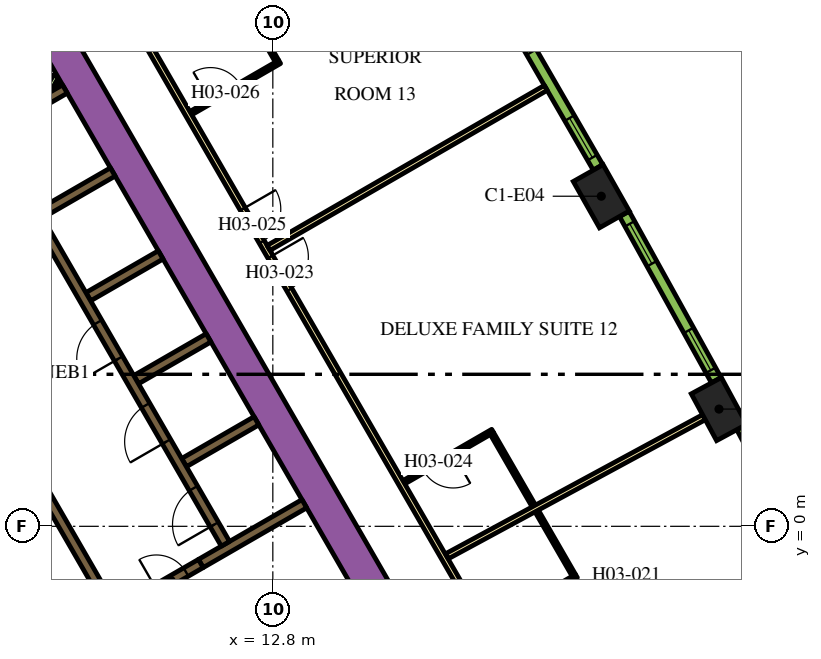
"""IFC4 building model, lengths in metres.
Left out: names, types, materials, properties, quantities, classifications, styles, units other than length and angle.
Written with IfcOpenShell. Run it as: python <this file> out.ifc"""

import sys

from ifc_helpers import new_model, si_unit, direction, frame, frame_2d, origin, origin_2d, place, context, subcontext, project, spatial, polyline, rectangle, outline, extrude, element, fill, save


model = new_model("IFC4")
c1 = context("Model", 3, precision=1e-05, world=origin(), true_north=direction((0.0, 1.0)))
c2 = subcontext(c1, "Body", "Model", "MODEL_VIEW")
j1 = project(units=[si_unit("LENGTHUNIT", "METRE"), si_unit("PLANEANGLEUNIT", "RADIAN")], contexts=[c1])
p1 = place(None, origin())
s1 = spatial("IfcSite", under=j1, at=p1, CompositionType="ELEMENT")
p2 = place(p1, origin())
s2 = spatial("IfcBuilding", under=s1, at=p2, CompositionType="ELEMENT")
p3 = place(p2, frame((0.0, 0.0, 51.0)))
s3 = spatial("IfcBuildingStorey", under=s2, at=p3, CompositionType="ELEMENT", Elevation=51.0)
for number, where, z_axis, x_axis in (
    (1, (24.54, 3.085, 0.0), (0.0, 0.0, 1.0), (-0.476, 0.88, 0.0)),
    (2, (21.443, 8.685, 0.0), (0.0, 0.0, 1.0), (-0.492, 0.871, 0.0)),
):
    element("IfcColumn", number, at=place(p3, frame(where, z_axis=z_axis, x_axis=x_axis)), inside=s3, PredefinedType="COLUMN", context=c2, shape_type="SweptSolid", body=[
        extrude(rectangle(XDim=1.4, YDim=0.9, at=origin_2d()), origin(), (0.0, 0.0, 1.0), 3.9),
    ])
p4 = place(p3, frame((6.776, 13.364, 0.0), z_axis=(0.0, 0.0, 1.0), x_axis=(0.500004177138, -0.8660229921, 0.0)))
e3 = element("IfcWall", 3, at=p4, inside=s3, PredefinedType="SOLIDWALL", context=c2, shape_type="SweptSolid", body=[
    extrude(rectangle(XDim=20.204, YDim=0.9, at=frame_2d((10.102, 0.0))), origin(), (0.0, 0.0, 1.0), 3.9),
])
p5 = place(p3, frame((10.464, 1.677, 0.0), z_axis=(0.0, 0.0, 1.0), x_axis=(0.86605622881, 0.499946605688, 0.0)))
e4 = element("IfcWall", 4, at=p5, inside=s3, PredefinedType="SOLIDWALL", context=c2, shape_type="SweptSolid", body=[
    extrude(rectangle(XDim=2.2, YDim=0.25, at=frame_2d((1.1, 0.0))), origin(), (0.0, 0.0, 1.0), 3.9),
])
p6 = place(p3, frame((13.629, 0.594, 0.0), z_axis=(0.0, 0.0, 1.0), x_axis=(-0.86602790099, -0.499995674689, 0.0)))
e5 = element("IfcWall", 5, at=p6, inside=s3, PredefinedType="SOLIDWALL", context=c2, shape_type="SweptSolid", body=[
    extrude(rectangle(XDim=3.146, YDim=0.25, at=frame_2d((1.573, 0.0))), origin(), (0.0, 0.0, 1.0), 3.9),
])
for number, where, z_axis, x_axis in (
    (6, (9.204, 3.859, 0.0), (0.0, 0.0, 1.0), (0.866, 0.5, 0.0)),
    (7, (7.944, 6.041, 0.0), (0.0, 0.0, 1.0), (0.866, 0.5, 0.0)),
    (8, (6.684, 8.224, 0.0), (0.0, 0.0, 1.0), (0.866, 0.5, 0.0)),
):
    element("IfcWall", number, at=place(p3, frame(where, z_axis=z_axis, x_axis=x_axis)), inside=s3, PredefinedType="SOLIDWALL", context=c2, shape_type="SweptSolid", body=[
        extrude(rectangle(XDim=2.2, YDim=0.25, at=frame_2d((1.1, 0.0))), origin(), (0.0, 0.0, 1.0), 3.9),
    ])
p7 = place(p3, origin())
e9 = element("IfcWall", 9, at=p7, inside=s3, PredefinedType="SOLIDWALL", context=c2, shape_type="SweptSolid", body=[
    extrude(outline(polyline([(5.27, 10.173), (5.27, 10.173), (4.683, 9.834), (4.504, 9.731), (4.442, 9.839), (4.431, 9.856), (4.419, 9.871), (4.406, 9.885), (4.39, 9.898), (4.374, 9.909), (4.357, 9.918), (4.341, 9.925), (7.266, 11.614), (7.391, 11.398), (5.486, 10.298), (5.486, 10.298), (5.27, 10.173), (5.27, 10.173)])), origin(), (0.0, 0.0, 1.0), 3.9),
])
p8 = place(p3, frame((6.872, 11.45, 0.0), z_axis=(0.0, 0.0, 1.0), x_axis=(0.499846793097, 0.866113839764, 0.0)))
e10 = element("IfcWall", 10, at=p8, inside=s3, PredefinedType="PARTITIONING", context=c2, shape_type="SweptSolid", body=[
    extrude(rectangle(XDim=0.453, YDim=0.15, at=frame_2d((0.227, 0.0))), origin(), (0.0, 0.0, 1.0), 2.75),
])
p9 = place(p3, frame((7.131, 11.6, 0.0), z_axis=(0.0, 0.0, 1.0), x_axis=(0.498600033135, 0.866832167699, 0.0)))
e11 = element("IfcWall", 11, at=p9, inside=s3, PredefinedType="PARTITIONING", context=c2, shape_type="SweptSolid", body=[
    extrude(rectangle(XDim=0.107, YDim=0.15, at=frame_2d((0.053, 0.0))), origin(), (0.0, 0.0, 1.0), 2.75),
])
p10 = place(p3, frame((11.553, -0.46, 0.0), z_axis=(0.0, 0.0, 1.0), x_axis=(-0.500006514828, 0.866021642414, 0.0)))
e12 = element("IfcWall", 12, at=p10, inside=s3, PredefinedType="SOLIDWALL", context=c2, shape_type="SweptSolid", body=[
    extrude(rectangle(XDim=12.35, YDim=0.25, at=frame_2d((6.175, 0.0))), origin(), (0.0, 0.0, 1.0), 3.9),
])
p11 = place(p10, frame((0.585, 0.0, 0.0)))
e13 = element("IfcOpeningElement", 13, at=p11, cuts=e12, PredefinedType="OPENING", context=c2, shape_type="SweptSolid", body=[
    extrude(rectangle(XDim=1.1, YDim=2.1, at=frame_2d((0.55, 1.05))), frame((0.0, 0.135, 0.0), z_axis=(0.0, -1.0, 0.0), x_axis=(1.0, 0.0, 0.0)), (0.0, 0.0, 1.0), 0.27),
])
p12 = place(p10, frame((3.105, 0.0, 0.0)))
e14 = element("IfcOpeningElement", 14, at=p12, cuts=e12, PredefinedType="OPENING", context=c2, shape_type="SweptSolid", body=[
    extrude(rectangle(XDim=1.1, YDim=2.1, at=frame_2d((0.55, 1.05))), frame((0.0, 0.135, 0.0), z_axis=(0.0, -1.0, 0.0), x_axis=(1.0, 0.0, 0.0)), (0.0, 0.0, 1.0), 0.27),
])
p13 = place(p10, frame((5.625, 0.0, 0.0)))
e15 = element("IfcOpeningElement", 15, at=p13, cuts=e12, PredefinedType="OPENING", context=c2, shape_type="SweptSolid", body=[
    extrude(rectangle(XDim=1.1, YDim=2.1, at=frame_2d((0.55, 1.05))), frame((0.0, 0.135, 0.0), z_axis=(0.0, -1.0, 0.0), x_axis=(1.0, 0.0, 0.0)), (0.0, 0.0, 1.0), 0.27),
])
p14 = place(p3, frame((8.565, -2.185, 0.0), z_axis=(0.0, 0.0, 1.0), x_axis=(-0.499997954832, 0.866026584559, 0.0)))
e16 = element("IfcWall", 16, at=p14, inside=s3, PredefinedType="SOLIDWALL", context=c2, shape_type="SweptSolid", body=[
    extrude(rectangle(XDim=12.35, YDim=0.25, at=frame_2d((6.175, 0.0))), origin(), (0.0, 0.0, 1.0), 3.9),
])
p15 = place(p14, frame((5.725, 0.0, 0.0)))
e17 = element("IfcOpeningElement", 17, at=p15, cuts=e16, PredefinedType="OPENING", context=c2, shape_type="SweptSolid", body=[
    extrude(rectangle(XDim=0.9, YDim=2.1, at=frame_2d((0.45, 1.05))), frame((0.0, 0.135, 0.0), z_axis=(0.0, -1.0, 0.0), x_axis=(1.0, 0.0, 0.0)), (0.0, 0.0, 1.0), 0.27),
])
p16 = place(p3, frame((9.346, -1.879, 0.0), z_axis=(0.0, 0.0, 1.0), x_axis=(0.866047807691, 0.499961193289, 0.0)))
e18 = element("IfcWall", 18, at=p16, inside=s3, PredefinedType="SOLIDWALL", context=c2, shape_type="SweptSolid", body=[
    extrude(rectangle(XDim=1.8, YDim=0.25, at=frame_2d((0.9, 0.0))), origin(), (0.0, 0.0, 1.0), 3.9),
])
p17 = place(p16, frame((0.45, 0.0, 0.0)))
e19 = element("IfcOpeningElement", 19, at=p17, cuts=e18, PredefinedType="OPENING", context=c2, shape_type="SweptSolid", body=[
    extrude(rectangle(XDim=0.9, YDim=2.1, at=frame_2d((0.45, 1.05))), frame((0.0, 0.135, 0.0), z_axis=(0.0, -1.0, 0.0), x_axis=(1.0, 0.0, 0.0)), (0.0, 0.0, 1.0), 0.27),
])
p18 = place(p3, frame((6.163, 18.475, 0.0), z_axis=(0.0, 0.0, 1.0), x_axis=(0.500001317485, -0.866024643133, 0.0)))
e20 = element("IfcWall", 20, at=p18, inside=s3, PredefinedType="PARTITIONING", context=c2, shape_type="SweptSolid", body=[
    extrude(rectangle(XDim=25.767, YDim=0.15, at=frame_2d((12.883, 0.0))), origin(), (0.0, 0.0, 1.0), 2.75),
])
p19 = place(p18, frame((24.586, 0.0, 0.0)))
e21 = element("IfcOpeningElement", 21, at=p19, cuts=e20, PredefinedType="OPENING", context=c2, shape_type="SweptSolid", body=[
    extrude(rectangle(XDim=1.0, YDim=2.1, at=frame_2d((0.5, 1.05))), frame((0.0, 0.085, 0.0), z_axis=(0.0, -1.0, 0.0), x_axis=(1.0, 0.0, 0.0)), (0.0, 0.0, 1.0), 0.17),
])
p20 = place(p18, frame((13.144, 0.0, 0.0)))
e22 = element("IfcOpeningElement", 22, at=p20, cuts=e20, PredefinedType="OPENING", context=c2, shape_type="SweptSolid", body=[
    extrude(rectangle(XDim=1.0, YDim=2.1, at=frame_2d((0.5, 1.05))), frame((0.0, 0.085, 0.0), z_axis=(0.0, -1.0, 0.0), x_axis=(1.0, 0.0, 0.0)), (0.0, 0.0, 1.0), 0.17),
])
p21 = place(p18, frame((11.692, 0.0, 0.0)))
e23 = element("IfcOpeningElement", 23, at=p21, cuts=e20, PredefinedType="OPENING", context=c2, shape_type="SweptSolid", body=[
    extrude(rectangle(XDim=1.0, YDim=2.1, at=frame_2d((0.5, 1.05))), frame((0.0, 0.085, 0.0), z_axis=(0.0, -1.0, 0.0), x_axis=(1.0, 0.0, 0.0)), (0.0, 0.0, 1.0), 0.17),
])
p22 = place(p18, frame((0.572, 0.0, 0.0)))
e24 = element("IfcOpeningElement", 24, at=p22, cuts=e20, PredefinedType="OPENING", context=c2, shape_type="SweptSolid", body=[
    extrude(rectangle(XDim=1.0, YDim=2.1, at=frame_2d((0.5, 1.05))), frame((0.0, 0.085, 0.0), z_axis=(0.0, -1.0, 0.0), x_axis=(1.0, 0.0, 0.0)), (0.0, 0.0, 1.0), 0.17),
])
p23 = place(p3, frame((19.982, 11.537, 0.0), z_axis=(0.0, 0.0, 1.0), x_axis=(-0.866020994654, -0.500007636761, 0.0)))
e25 = element("IfcWall", 25, at=p23, inside=s3, PredefinedType="PARTITIONING", context=c2, shape_type="SweptSolid", body=[
    extrude(rectangle(XDim=8.423, YDim=0.15, at=frame_2d((4.211, 0.0))), origin(), (0.0, 0.0, 1.0), 2.75),
])
p24 = place(p3, frame((24.145, 2.871, 0.0), z_axis=(0.0, 0.0, 1.0), x_axis=(-0.879551725039, -0.475803281809, 0.0)))
e26 = element("IfcWall", 26, at=p24, inside=s3, PredefinedType="PARTITIONING", context=c2, shape_type="SweptSolid", body=[
    extrude(rectangle(XDim=7.688, YDim=0.15, at=frame_2d((3.844, 0.0))), origin(), (0.0, 0.0, 1.0), 2.75),
])
p25 = place(p3, frame((18.451, -2.657, 0.0), z_axis=(0.0, 0.0, 1.0), x_axis=(0.86599734893, 0.500048589285, 0.0)))
e27 = element("IfcWall", 27, at=p25, inside=s3, PredefinedType="PARTITIONING", context=c2, shape_type="SweptSolid", body=[
    extrude(rectangle(XDim=2.7, YDim=0.1, at=frame_2d((1.35, 0.0))), origin(), (0.0, 0.0, 1.0), 2.75),
])
p26 = place(p25, frame((0.6, 0.0, 0.0)))
e28 = element("IfcOpeningElement", 28, at=p26, cuts=e27, PredefinedType="OPENING", context=c2, shape_type="SweptSolid", body=[
    extrude(rectangle(XDim=0.9, YDim=2.1, at=frame_2d((0.45, 1.05))), frame((0.0, 0.06, 0.0), z_axis=(0.0, -1.0, 0.0), x_axis=(1.0, 0.0, 0.0)), (0.0, 0.0, 1.0), 0.12),
])
p27 = place(p3, frame((20.716, -1.281, 0.0), z_axis=(0.0, 0.0, 1.0), x_axis=(-0.499969367985, 0.866043088465, 0.0)))
e29 = element("IfcWall", 29, at=p27, inside=s3, PredefinedType="PARTITIONING", context=c2, shape_type="SweptSolid", body=[
    extrude(rectangle(XDim=1.94, YDim=0.1, at=frame_2d((0.97, 0.0))), origin(), (0.0, 0.0, 1.0), 2.75),
])
p28 = place(p3, frame((18.586, 2.509, 0.0), z_axis=(0.0, 0.0, 1.0), x_axis=(-0.866059108428, -0.4999416173, 0.0)))
e30 = element("IfcWall", 30, at=p28, inside=s3, PredefinedType="PARTITIONING", context=c2, shape_type="SweptSolid", body=[
    extrude(rectangle(XDim=2.7, YDim=0.1, at=frame_2d((1.35, 0.0))), origin(), (0.0, 0.0, 1.0), 2.75),
])
p29 = place(p28, frame((1.2, 0.0, 0.0)))
e31 = element("IfcOpeningElement", 31, at=p29, cuts=e30, PredefinedType="OPENING", context=c2, shape_type="SweptSolid", body=[
    extrude(rectangle(XDim=0.9, YDim=2.1, at=frame_2d((0.45, 1.05))), frame((0.0, 0.06, 0.0), z_axis=(0.0, -1.0, 0.0), x_axis=(1.0, 0.0, 0.0)), (0.0, 0.0, 1.0), 0.12),
])
p30 = place(p3, frame((18.567, 2.441, 0.0), z_axis=(0.0, 0.0, 1.0), x_axis=(0.499946605688, -0.86605622881, 0.0)))
e32 = element("IfcWall", 32, at=p30, inside=s3, PredefinedType="PARTITIONING", context=c2, shape_type="SweptSolid", body=[
    extrude(rectangle(XDim=2.2, YDim=0.1, at=frame_2d((1.1, 0.0))), origin(), (0.0, 0.0, 1.0), 2.75),
])
p31 = place(p3, frame((10.64, 10.871, 0.0), z_axis=(0.0, 0.0, 1.0), x_axis=(0.866036505625, 0.499980770555, 0.0)))
e33 = element("IfcWall", 33, at=p31, inside=s3, PredefinedType="PARTITIONING", context=c2, shape_type="SweptSolid", body=[
    extrude(rectangle(XDim=2.7, YDim=0.1, at=frame_2d((1.35, 0.0))), origin(), (0.0, 0.0, 1.0), 2.75),
])
p32 = place(p31, frame((0.6, 0.0, 0.0)))
e34 = element("IfcOpeningElement", 34, at=p32, cuts=e33, PredefinedType="OPENING", context=c2, shape_type="SweptSolid", body=[
    extrude(rectangle(XDim=0.9, YDim=2.1, at=frame_2d((0.45, 1.05))), frame((0.0, 0.06, 0.0), z_axis=(0.0, -1.0, 0.0), x_axis=(1.0, 0.0, 0.0)), (0.0, 0.0, 1.0), 0.12),
])
p33 = place(p3, frame((12.91, 12.239, 0.0), z_axis=(0.0, 0.0, 1.0), x_axis=(-0.499957272447, 0.866050071143, 0.0)))
e35 = element("IfcWall", 35, at=p33, inside=s3, PredefinedType="PARTITIONING", context=c2, shape_type="SweptSolid", body=[
    extrude(rectangle(XDim=2.07, YDim=0.1, at=frame_2d((1.035, 0.0))), origin(), (0.0, 0.0, 1.0), 2.75),
])
p34 = place(p3, frame((27.475, -1.81, 0.0), z_axis=(0.0, 0.0, 1.0), x_axis=(-0.467629620899, 0.883924509026, 0.0)))
e36 = element("IfcWall", 36, at=p34, inside=s3, PredefinedType="SOLIDWALL", context=c2, shape_type="SweptSolid", body=[
    extrude(rectangle(XDim=4.998, YDim=0.29, at=frame_2d((2.499, 0.0))), origin(), (0.0, 0.0, 1.0), 3.65),
])
p35 = place(p34, frame((0.297, 0.0, 0.9)))
e37 = element("IfcOpeningElement", 37, at=p35, cuts=e36, PredefinedType="OPENING", context=c2, shape_type="SweptSolid", body=[
    extrude(rectangle(XDim=1.2, YDim=2.15, at=frame_2d((0.6, 1.075))), frame((0.0, 0.155, 0.0), z_axis=(0.0, -1.0, 0.0), x_axis=(1.0, 0.0, 0.0)), (0.0, 0.0, 1.0), 0.31),
])
p36 = place(p34, frame((3.501, 0.0, 0.9)))
e38 = element("IfcOpeningElement", 38, at=p36, cuts=e36, PredefinedType="OPENING", context=c2, shape_type="SweptSolid", body=[
    extrude(rectangle(XDim=1.2, YDim=2.15, at=frame_2d((0.6, 1.075))), frame((0.0, 0.155, 0.0), z_axis=(0.0, -1.0, 0.0), x_axis=(1.0, 0.0, 0.0)), (0.0, 0.0, 1.0), 0.31),
])
p37 = place(p3, frame((24.468, 3.846, 0.0), z_axis=(0.0, 0.0, 1.0), x_axis=(-0.483912572871, 0.875116347589, 0.0)))
e39 = element("IfcWall", 39, at=p37, inside=s3, PredefinedType="SOLIDWALL", context=c2, shape_type="SweptSolid", body=[
    extrude(rectangle(XDim=4.998, YDim=0.29, at=frame_2d((2.499, 0.0))), origin(), (0.0, 0.0, 1.0), 3.65),
])
p38 = place(p37, frame((0.297, 0.0, 0.9)))
e40 = element("IfcOpeningElement", 40, at=p38, cuts=e39, PredefinedType="OPENING", context=c2, shape_type="SweptSolid", body=[
    extrude(rectangle(XDim=1.2, YDim=2.15, at=frame_2d((0.6, 1.075))), frame((0.0, 0.155, 0.0), z_axis=(0.0, -1.0, 0.0), x_axis=(1.0, 0.0, 0.0)), (0.0, 0.0, 1.0), 0.31),
])
p39 = place(p37, frame((3.501, 0.0, 0.9)))
e41 = element("IfcOpeningElement", 41, at=p39, cuts=e39, PredefinedType="OPENING", context=c2, shape_type="SweptSolid", body=[
    extrude(rectangle(XDim=1.2, YDim=2.15, at=frame_2d((0.6, 1.075))), frame((0.0, 0.155, 0.0), z_axis=(0.0, -1.0, 0.0), x_axis=(1.0, 0.0, 0.0)), (0.0, 0.0, 1.0), 0.31),
])
p40 = place(p3, frame((21.357, 9.445, 0.0), z_axis=(0.0, 0.0, 1.0), x_axis=(-0.50002123722, 0.866013142123, 0.0)))
e42 = element("IfcWall", 42, at=p40, inside=s3, PredefinedType="SOLIDWALL", context=c2, shape_type="SweptSolid", body=[
    extrude(rectangle(XDim=4.998, YDim=0.29, at=frame_2d((2.499, 0.0))), origin(), (0.0, 0.0, 1.0), 3.65),
])
p41 = place(p40, frame((0.297, 0.0, 0.9)))
e43 = element("IfcOpeningElement", 43, at=p41, cuts=e42, PredefinedType="OPENING", context=c2, shape_type="SweptSolid", body=[
    extrude(rectangle(XDim=1.2, YDim=2.15, at=frame_2d((0.6, 1.075))), frame((0.0, 0.155, 0.0), z_axis=(0.0, -1.0, 0.0), x_axis=(1.0, 0.0, 0.0)), (0.0, 0.0, 1.0), 0.31),
])
p42 = place(p40, frame((3.501, 0.0, 0.9)))
e44 = element("IfcOpeningElement", 44, at=p42, cuts=e42, PredefinedType="OPENING", context=c2, shape_type="SweptSolid", body=[
    extrude(rectangle(XDim=1.2, YDim=2.15, at=frame_2d((0.6, 1.075))), frame((0.0, 0.155, 0.0), z_axis=(0.0, -1.0, 0.0), x_axis=(1.0, 0.0, 0.0)), (0.0, 0.0, 1.0), 0.31),
])
p43 = place(p11, origin())
e45 = element("IfcDoor", 45, at=p43, inside=s3, OperationType="DOUBLE_DOOR_SLIDING", PredefinedType="DOOR", context=c2, shape_type="SweptSolid", body=[
    extrude(rectangle(XDim=1.1, YDim=2.1, at=frame_2d((0.55, 1.05))), frame((0.0, 0.025, 0.0), z_axis=(0.0, -1.0, 0.0), x_axis=(1.0, 0.0, 0.0)), (0.0, 0.0, 1.0), 0.05),
])
fill(e13, e45)
p44 = place(p12, origin())
e46 = element("IfcDoor", 46, at=p44, inside=s3, OperationType="DOUBLE_DOOR_SLIDING", PredefinedType="DOOR", context=c2, shape_type="SweptSolid", body=[
    extrude(rectangle(XDim=1.1, YDim=2.1, at=frame_2d((0.55, 1.05))), frame((0.0, 0.025, 0.0), z_axis=(0.0, -1.0, 0.0), x_axis=(1.0, 0.0, 0.0)), (0.0, 0.0, 1.0), 0.05),
])
fill(e14, e46)
p45 = place(p13, origin())
e47 = element("IfcDoor", 47, at=p45, inside=s3, OperationType="DOUBLE_DOOR_SLIDING", PredefinedType="DOOR", context=c2, shape_type="SweptSolid", body=[
    extrude(rectangle(XDim=1.1, YDim=2.1, at=frame_2d((0.55, 1.05))), frame((0.0, 0.025, 0.0), z_axis=(0.0, -1.0, 0.0), x_axis=(1.0, 0.0, 0.0)), (0.0, 0.0, 1.0), 0.05),
])
fill(e15, e47)
p46 = place(p17, origin())
e48 = element("IfcDoor", 48, at=p46, inside=s3, OperationType="SINGLE_SWING_LEFT", PredefinedType="DOOR", context=c2, shape_type="SweptSolid", body=[
    extrude(rectangle(XDim=0.9, YDim=2.1, at=frame_2d((0.45, 1.05))), frame((0.0, 0.025, 0.0), z_axis=(0.0, -1.0, 0.0), x_axis=(1.0, 0.0, 0.0)), (0.0, 0.0, 1.0), 0.05),
])
fill(e19, e48)
p47 = place(p20, origin())
e49 = element("IfcDoor", 49, at=p47, inside=s3, OperationType="SINGLE_SWING_LEFT", PredefinedType="DOOR", context=c2, shape_type="SweptSolid", body=[
    extrude(rectangle(XDim=1.0, YDim=2.1, at=frame_2d((0.5, 1.05))), frame((0.0, 0.025, 0.0), z_axis=(0.0, -1.0, 0.0), x_axis=(1.0, 0.0, 0.0)), (0.0, 0.0, 1.0), 0.05),
])
fill(e22, e49)
p48 = place(p29, origin())
e50 = element("IfcDoor", 50, at=p48, inside=s3, OperationType="SINGLE_SWING_RIGHT", PredefinedType="DOOR", context=c2, shape_type="SweptSolid", body=[
    extrude(rectangle(XDim=0.9, YDim=2.1, at=frame_2d((0.45, 1.05))), frame((0.0, 0.025, 0.0), z_axis=(0.0, -1.0, 0.0), x_axis=(1.0, 0.0, 0.0)), (0.0, 0.0, 1.0), 0.05),
])
fill(e31, e50)
p49 = place(p21, origin())
e51 = element("IfcDoor", 51, at=p49, inside=s3, OperationType="SINGLE_SWING_RIGHT", PredefinedType="DOOR", context=c2, shape_type="SweptSolid", body=[
    extrude(rectangle(XDim=1.0, YDim=2.1, at=frame_2d((0.5, 1.05))), frame((0.0, 0.025, 0.0), z_axis=(0.0, -1.0, 0.0), x_axis=(1.0, 0.0, 0.0)), (0.0, 0.0, 1.0), 0.05),
])
fill(e23, e51)
p50 = place(p32, origin())
e52 = element("IfcDoor", 52, at=p50, inside=s3, OperationType="SINGLE_SWING_LEFT", PredefinedType="DOOR", context=c2, shape_type="SweptSolid", body=[
    extrude(rectangle(XDim=0.9, YDim=2.1, at=frame_2d((0.45, 1.05))), frame((0.0, 0.025, 0.0), z_axis=(0.0, -1.0, 0.0), x_axis=(1.0, 0.0, 0.0)), (0.0, 0.0, 1.0), 0.05),
])
fill(e34, e52)
p51 = place(p38, origin())
e53 = element("IfcWindow", 53, at=p51, inside=s3, PartitioningType="DOUBLE_PANEL_VERTICAL", PredefinedType="WINDOW", context=c2, shape_type="SweptSolid", body=[
    extrude(rectangle(XDim=1.2, YDim=2.15, at=frame_2d((0.6, 1.075))), frame((0.0, 0.015, 0.0), z_axis=(0.0, -1.0, 0.0), x_axis=(1.0, 0.0, 0.0)), (0.0, 0.0, 1.0), 0.06),
])
fill(e40, e53)
p52 = place(p39, origin())
e54 = element("IfcWindow", 54, at=p52, inside=s3, PartitioningType="DOUBLE_PANEL_VERTICAL", PredefinedType="WINDOW", context=c2, shape_type="SweptSolid", body=[
    extrude(rectangle(XDim=1.2, YDim=2.15, at=frame_2d((0.6, 1.075))), frame((0.0, 0.015, 0.0), z_axis=(0.0, -1.0, 0.0), x_axis=(1.0, 0.0, 0.0)), (0.0, 0.0, 1.0), 0.06),
])
fill(e41, e54)
p53 = place(p41, origin())
e55 = element("IfcWindow", 55, at=p53, inside=s3, PartitioningType="DOUBLE_PANEL_VERTICAL", PredefinedType="WINDOW", context=c2, shape_type="SweptSolid", body=[
    extrude(rectangle(XDim=1.2, YDim=2.15, at=frame_2d((0.6, 1.075))), frame((0.0, 0.015, 0.0), z_axis=(0.0, -1.0, 0.0), x_axis=(1.0, 0.0, 0.0)), (0.0, 0.0, 1.0), 0.06),
])
fill(e43, e55)
save(model, sys.argv[1])
